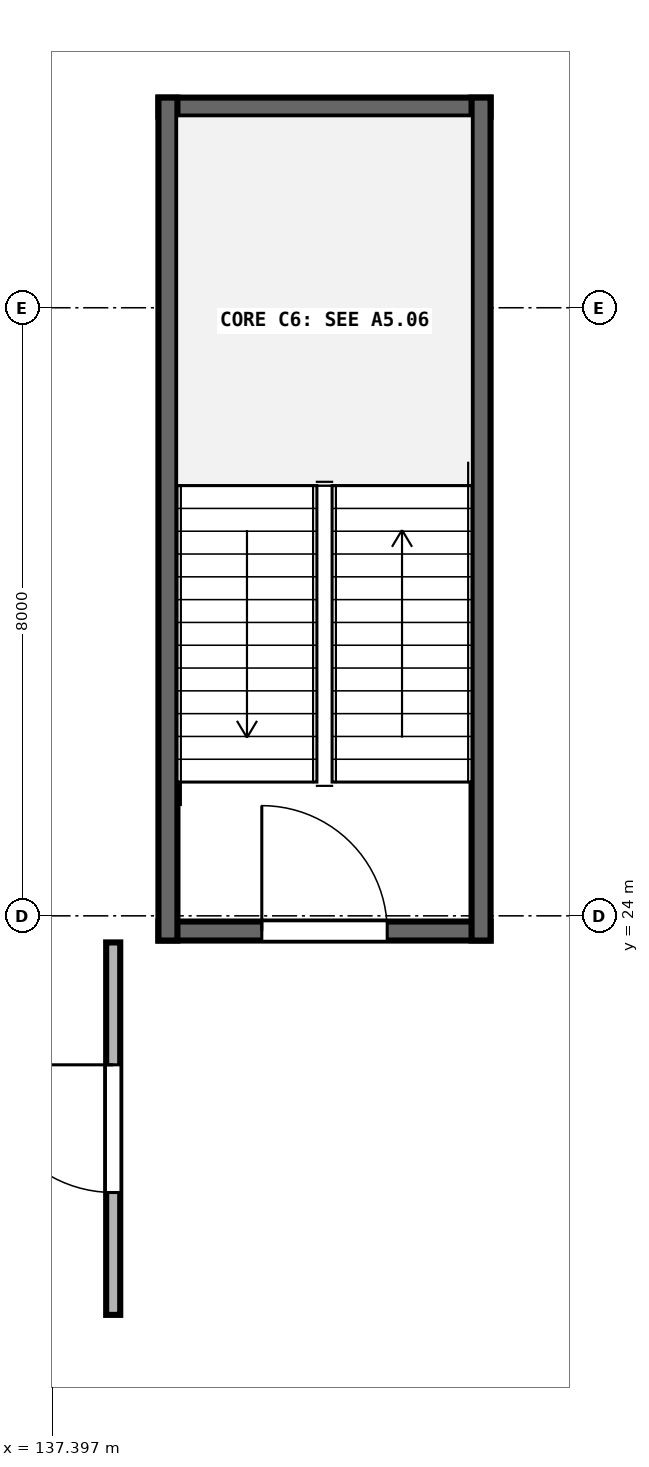
"""IFC4 building model, lengths in metres.
Left out: names, types, materials, properties, quantities, classifications, styles, units other than length and angle.
Written with IfcOpenShell. Run it as: python <this file> out.ifc"""

import sys

from ifc_helpers import new_model, si_unit, direction, frame, frame_2d, origin, place, context, subcontext, project, spatial, rectangle, extrude, element, fill, save


model = new_model("IFC4")
c1 = context("Model", 3, precision=1e-05, world=origin(), true_north=direction((0.0, 1.0)))
c2 = subcontext(c1, "Body", "Model", "MODEL_VIEW")
j1 = project(units=[si_unit("LENGTHUNIT", "METRE"), si_unit("PLANEANGLEUNIT", "RADIAN")], contexts=[c1])
p1 = place(None, origin())
s1 = spatial("IfcSite", under=j1, at=p1, CompositionType="ELEMENT")
p2 = place(p1, origin())
s2 = spatial("IfcBuilding", under=s1, at=p2, CompositionType="ELEMENT")
p3 = place(p2, frame((0.0, 0.0, -4.8)))
s3 = spatial("IfcBuildingStorey", under=s2, at=p3, CompositionType="ELEMENT", Elevation=-4.8)
p4 = place(p3, frame((138.795, 23.8, 0.0), z_axis=(0.0, 0.0, 1.0), x_axis=(1.0, 0.0, 0.0)))
e1 = element("IfcWall", 1, at=p4, inside=s3, PredefinedType="SHEAR", context=c2, shape_type="SweptSolid", body=[
    extrude(rectangle(XDim=4.37, YDim=0.25, at=frame_2d((2.185, 0.0))), origin(), (0.0, 0.0, 1.0), 4.5),
])
p5 = place(p4, frame((1.36, 0.0, 0.0)))
e2 = element("IfcOpeningElement", 2, at=p5, cuts=e1, PredefinedType="OPENING", context=c2, shape_type="SweptSolid", body=[
    extrude(rectangle(XDim=1.65, YDim=2.22, at=frame_2d((0.825, 1.11))), frame((0.0, 0.135, 0.0), z_axis=(0.0, -1.0, 0.0), x_axis=(1.0, 0.0, 0.0)), (0.0, 0.0, 1.0), 0.27),
])
p6 = place(p3, frame((138.795, 34.64, 0.0), z_axis=(0.0, 0.0, 1.0), x_axis=(1.0, 0.0, 0.0)))
e3 = element("IfcWall", 3, at=p6, inside=s3, PredefinedType="SHEAR", context=c2, shape_type="SweptSolid", body=[
    extrude(rectangle(XDim=4.37, YDim=0.25, at=frame_2d((2.185, 0.0))), origin(), (0.0, 0.0, 1.0), 4.5),
])
for number, where, z_axis, x_axis in (
    (4, (138.92, 23.675, 0.0), (0.0, 0.0, 1.0), (0.0, 1.0, 0.0)),
    (5, (143.04, 23.675, 0.0), (0.0, 0.0, 1.0), (0.0, 1.0, 0.0)),
):
    element("IfcWall", number, at=place(p3, frame(where, z_axis=z_axis, x_axis=x_axis)), inside=s3, PredefinedType="SHEAR", context=c2, shape_type="SweptSolid", body=[
        extrude(rectangle(XDim=11.09, YDim=0.25, at=frame_2d((5.545, 0.0))), origin(), (0.0, 0.0, 1.0), 4.5),
    ])
p7 = place(p3, frame((138.2, 18.75, 0.0), z_axis=(0.0, 0.0, 1.0), x_axis=(0.0, 1.0, 0.0)))
e6 = element("IfcWall", 6, at=p7, inside=s3, PredefinedType="PARTITIONING", context=c2, shape_type="SweptSolid", body=[
    extrude(rectangle(XDim=4.9, YDim=0.185, at=frame_2d((2.45, 0.0))), origin(), (0.0, 0.0, 1.0), 4.45),
])
p8 = place(p7, frame((1.61, 0.0, 0.0)))
e7 = element("IfcOpeningElement", 7, at=p8, cuts=e6, PredefinedType="OPENING", context=c2, shape_type="SweptSolid", body=[
    extrude(rectangle(XDim=1.68, YDim=2.25, at=frame_2d((0.84, 1.125))), frame((0.0, 0.103, 0.0), z_axis=(0.0, -1.0, 0.0), x_axis=(1.0, 0.0, 0.0)), (0.0, 0.0, 1.0), 0.205),
])
p9 = place(p5, origin())
e8 = element("IfcDoor", 8, at=p9, inside=s3, OperationType="SINGLE_SWING_LEFT", PredefinedType="DOOR", context=c2, shape_type="SweptSolid", body=[
    extrude(rectangle(XDim=1.65, YDim=2.22, at=frame_2d((0.825, 1.11))), frame((0.0, 0.025, 0.0), z_axis=(0.0, -1.0, 0.0), x_axis=(1.0, 0.0, 0.0)), (0.0, 0.0, 1.0), 0.05),
])
fill(e2, e8)
p10 = place(p8, origin())
e9 = element("IfcDoor", 9, at=p10, inside=s3, OperationType="SINGLE_SWING_RIGHT", PredefinedType="DOOR", context=c2, shape_type="SweptSolid", body=[
    extrude(rectangle(XDim=1.68, YDim=2.25, at=frame_2d((0.84, 1.125))), frame((0.0, 0.025, 0.0), z_axis=(0.0, -1.0, 0.0), x_axis=(1.0, 0.0, 0.0)), (0.0, 0.0, 1.0), 0.05),
])
fill(e7, e9)
save(model, sys.argv[1])
